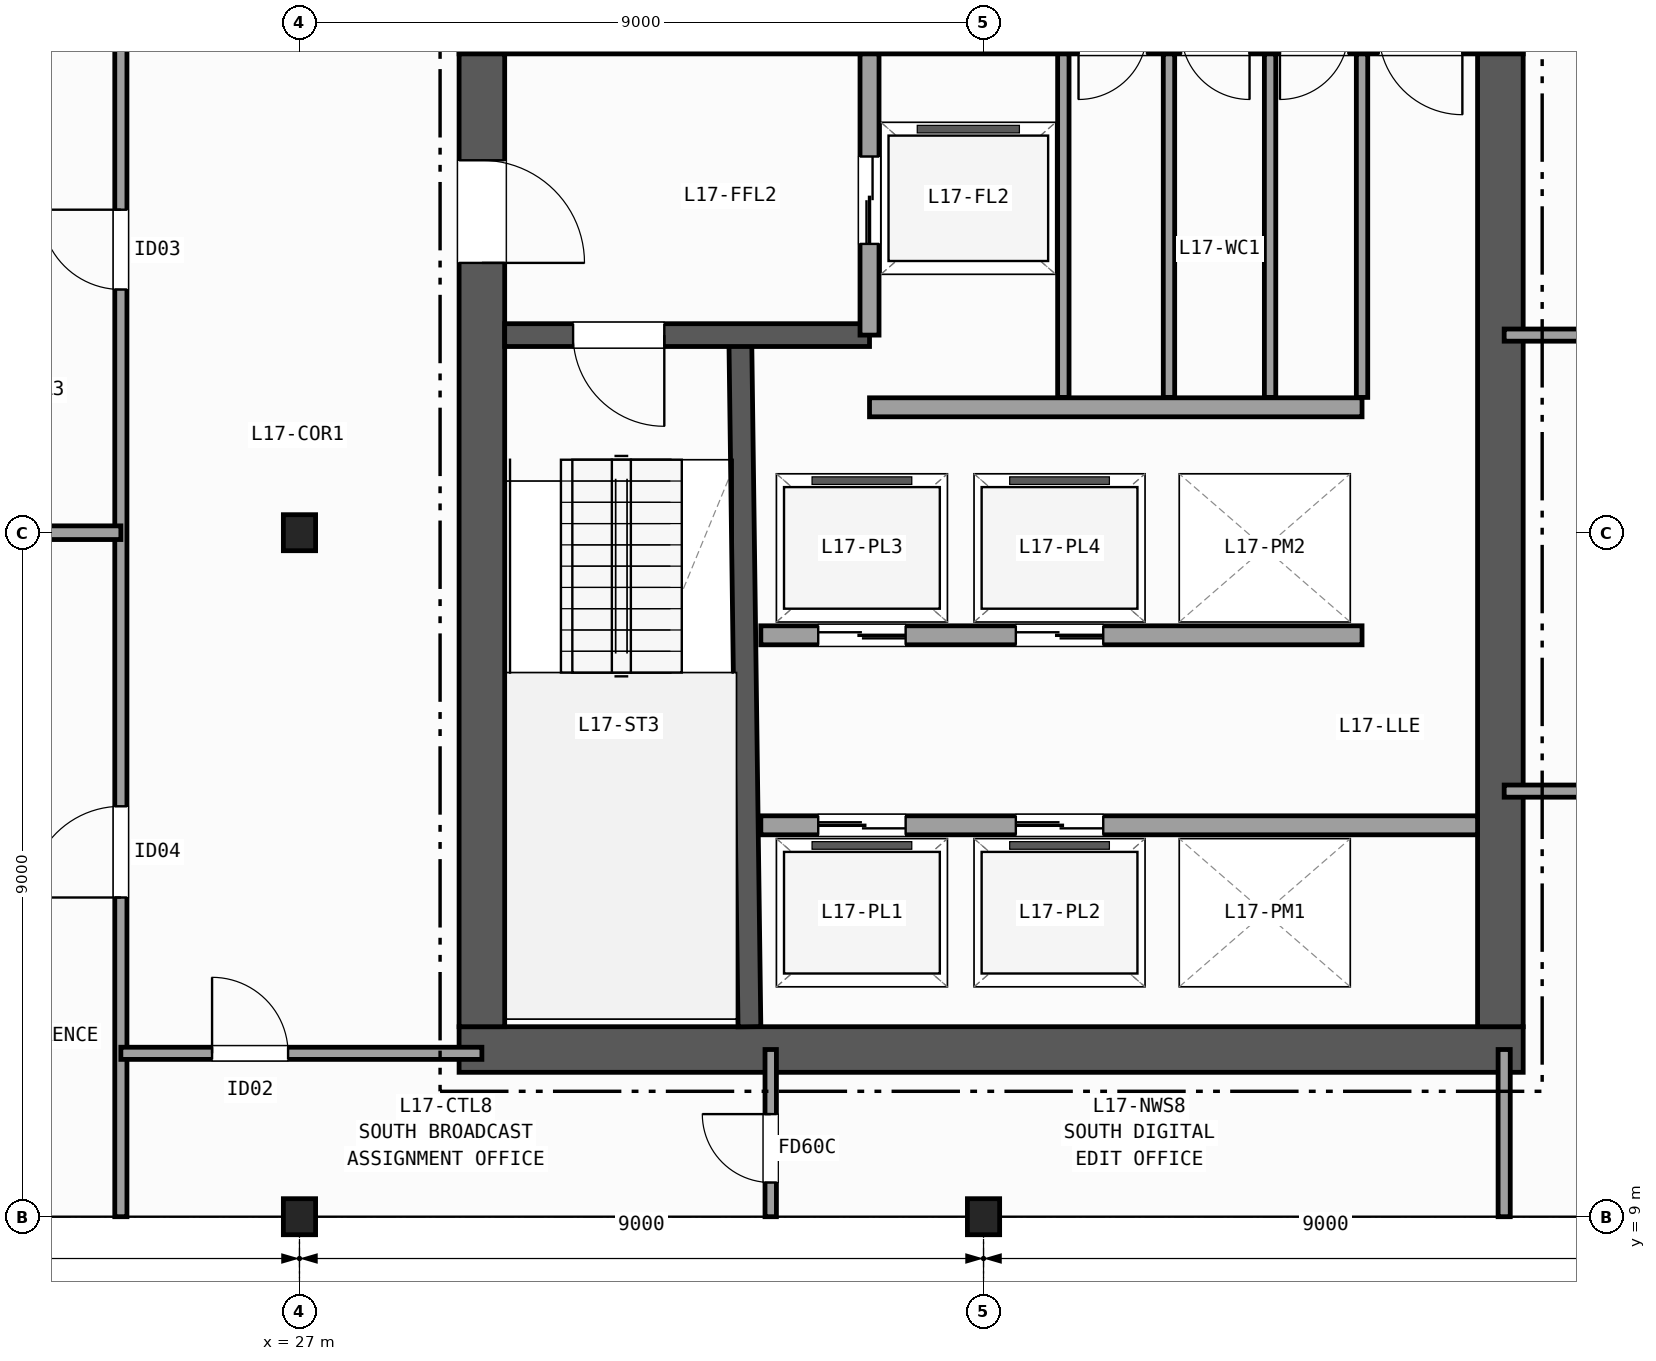
"""IFC4 building model, lengths in metres.
Left out: names, types, materials, properties, quantities, classifications, styles, units other than length and angle.
Written with IfcOpenShell. Run it as: python <this file> out.ifc"""

import sys

from ifc_helpers import new_model, si_unit, direction, frame, frame_2d, origin, origin_2d, place, context, subcontext, project, spatial, rectangle, i_section, extrude, element, fill, save


model = new_model("IFC4")
c1 = context("Model", 3, precision=1e-05, world=origin(), true_north=direction((0.0, 1.0)))
c2 = subcontext(c1, "Body", "Model", "MODEL_VIEW")
j1 = project(units=[si_unit("LENGTHUNIT", "METRE"), si_unit("PLANEANGLEUNIT", "RADIAN")], contexts=[c1])
p1 = place(None, origin())
s1 = spatial("IfcSite", under=j1, at=p1, CompositionType="ELEMENT")
p2 = place(p1, origin())
s2 = spatial("IfcBuilding", under=s1, at=p2, CompositionType="ELEMENT")
p3 = place(p2, frame((0.0, 0.0, 73.0)))
s3 = spatial("IfcBuildingStorey", under=s2, at=p3, CompositionType="ELEMENT", Elevation=73.0)
for number, where, z_axis, x_axis in (
    (1, (27.0, 9.0, 0.0), (0.0, 0.0, 1.0), (1.0, 0.0, 0.0)),
    (2, (27.0, 18.0, 0.0), (0.0, 0.0, 1.0), (1.0, 0.0, 0.0)),
    (3, (36.0, 9.0, 0.0), (0.0, 0.0, 1.0), (1.0, 0.0, 0.0)),
):
    element("IfcColumn", number, at=place(p3, frame(where, z_axis=z_axis, x_axis=x_axis)), inside=s3, PredefinedType="COLUMN", context=c2, shape_type="SweptSolid", body=[
        extrude(i_section(OverallWidth=0.424, OverallDepth=0.474, WebThickness=0.048, FlangeThickness=0.077, FilletRadius=0.015, at=origin_2d()), origin(), (0.0, 0.0, 1.0), 3.7),
    ])
p4 = place(p3, frame((29.1, 11.2, 0.0), z_axis=(0.0, 0.0, 1.0), x_axis=(1.0, 0.0, 0.0)))
e4 = element("IfcWall", 4, at=p4, inside=s3, PredefinedType="SHEAR", context=c2, shape_type="SweptSolid", body=[
    extrude(rectangle(XDim=14.0, YDim=0.6, at=frame_2d((7.0, 0.0))), origin(), (0.0, 0.0, 1.0), 3.42),
])
p5 = place(p3, frame((43.1, 24.6, 0.0), z_axis=(0.0, 0.0, 1.0), x_axis=(-1.0, 0.0, 0.0)))
e5 = element("IfcWall", 5, at=p5, inside=s3, PredefinedType="SHEAR", context=c2, shape_type="SweptSolid", body=[
    extrude(rectangle(XDim=14.0, YDim=0.6, at=frame_2d((7.0, 0.0))), origin(), (0.0, 0.0, 1.0), 3.42),
])
p6 = place(p5, frame((0.8, 0.0, 0.0)))
e6 = element("IfcOpeningElement", 6, at=p6, cuts=e5, PredefinedType="OPENING", context=c2, shape_type="SweptSolid", body=[
    extrude(rectangle(XDim=1.1, YDim=2.15, at=frame_2d((0.55, 1.075))), frame((0.0, 0.31, 0.0), z_axis=(0.0, -1.0, 0.0), x_axis=(1.0, 0.0, 0.0)), (0.0, 0.0, 1.0), 0.62),
])
p7 = place(p5, frame((2.3, 0.0, 0.0)))
e7 = element("IfcOpeningElement", 7, at=p7, cuts=e5, PredefinedType="OPENING", context=c2, shape_type="SweptSolid", body=[
    extrude(rectangle(XDim=0.9, YDim=2.1, at=frame_2d((0.45, 1.05))), frame((0.0, 0.31, 0.0), z_axis=(0.0, -1.0, 0.0), x_axis=(1.0, 0.0, 0.0)), (0.0, 0.0, 1.0), 0.62),
])
p8 = place(p5, frame((3.6, 0.0, 0.0)))
e8 = element("IfcOpeningElement", 8, at=p8, cuts=e5, PredefinedType="OPENING", context=c2, shape_type="SweptSolid", body=[
    extrude(rectangle(XDim=0.9, YDim=2.1, at=frame_2d((0.45, 1.05))), frame((0.0, 0.31, 0.0), z_axis=(0.0, -1.0, 0.0), x_axis=(1.0, 0.0, 0.0)), (0.0, 0.0, 1.0), 0.62),
])
p9 = place(p5, frame((4.95, 0.0, 0.0)))
e9 = element("IfcOpeningElement", 9, at=p9, cuts=e5, PredefinedType="OPENING", context=c2, shape_type="SweptSolid", body=[
    extrude(rectangle(XDim=0.9, YDim=2.1, at=frame_2d((0.45, 1.05))), frame((0.0, 0.31, 0.0), z_axis=(0.0, -1.0, 0.0), x_axis=(1.0, 0.0, 0.0)), (0.0, 0.0, 1.0), 0.62),
])
p10 = place(p3, frame((29.4, 24.3, 0.0), z_axis=(0.0, 0.0, 1.0), x_axis=(0.0, -1.0, 0.0)))
e10 = element("IfcWall", 10, at=p10, inside=s3, PredefinedType="SHEAR", context=c2, shape_type="SweptSolid", body=[
    extrude(rectangle(XDim=12.8, YDim=0.6, at=frame_2d((6.4, 0.0))), origin(), (0.0, 0.0, 1.0), 3.42),
])
p11 = place(p10, frame((1.4, 0.0, 0.0)))
e11 = element("IfcOpeningElement", 11, at=p11, cuts=e10, PredefinedType="OPENING", context=c2, shape_type="SweptSolid", body=[
    extrude(rectangle(XDim=1.35, YDim=2.15, at=frame_2d((0.675, 1.075))), frame((0.0, 0.31, 0.0), z_axis=(0.0, -1.0, 0.0), x_axis=(1.0, 0.0, 0.0)), (0.0, 0.0, 1.0), 0.62),
])
p12 = place(p3, frame((42.8, 11.5, 0.0), z_axis=(0.0, 0.0, 1.0), x_axis=(0.0, 1.0, 0.0)))
e12 = element("IfcWall", 12, at=p12, inside=s3, PredefinedType="SHEAR", context=c2, shape_type="SweptSolid", body=[
    extrude(rectangle(XDim=12.8, YDim=0.6, at=frame_2d((6.4, 0.0))), origin(), (0.0, 0.0, 1.0), 3.42),
])
p13 = place(p3, frame((32.92, 11.5, 0.0), z_axis=(0.0, 0.0, 1.0), x_axis=(-0.013244407292, 0.999912288991, 0.0)))
e13 = element("IfcWall", 13, at=p13, inside=s3, PredefinedType="SHEAR", context=c2, shape_type="SweptSolid", body=[
    extrude(rectangle(XDim=9.051, YDim=0.3, at=frame_2d((4.525, 0.0))), origin(), (0.0, 0.0, 1.0), 3.42),
])
p14 = place(p3, frame((34.5, 20.6, 0.0), z_axis=(0.0, 0.0, 1.0), x_axis=(-1.0, 0.0, 0.0)))
e14 = element("IfcWall", 14, at=p14, inside=s3, PredefinedType="SHEAR", context=c2, shape_type="SweptSolid", body=[
    extrude(rectangle(XDim=4.8, YDim=0.3, at=frame_2d((2.4, 0.0))), origin(), (0.0, 0.0, 1.0), 3.42),
])
p15 = place(p14, frame((2.7, 0.0, 0.0)))
e15 = element("IfcOpeningElement", 15, at=p15, cuts=e14, PredefinedType="OPENING", context=c2, shape_type="SweptSolid", body=[
    extrude(rectangle(XDim=1.2, YDim=2.15, at=frame_2d((0.6, 1.075))), frame((0.0, 0.16, 0.0), z_axis=(0.0, -1.0, 0.0), x_axis=(1.0, 0.0, 0.0)), (0.0, 0.0, 1.0), 0.32),
])
p16 = place(p3, frame((34.5, 20.6, 0.0), z_axis=(0.0, 0.0, 1.0), x_axis=(0.0, 1.0, 0.0)))
e16 = element("IfcWall", 16, at=p16, inside=s3, PredefinedType="PARTITIONING", context=c2, shape_type="SweptSolid", body=[
    extrude(rectangle(XDim=3.7, YDim=0.25, at=frame_2d((1.85, 0.0))), origin(), (0.0, 0.0, 1.0), 3.42),
])
p17 = place(p16, frame((1.2, 0.0, 0.0)))
e17 = element("IfcOpeningElement", 17, at=p17, cuts=e16, PredefinedType="OPENING", context=c2, shape_type="SweptSolid", body=[
    extrude(rectangle(XDim=1.15, YDim=2.15, at=frame_2d((0.575, 1.075))), frame((0.0, 0.135, 0.0), z_axis=(0.0, -1.0, 0.0), x_axis=(1.0, 0.0, 0.0)), (0.0, 0.0, 1.0), 0.27),
])
p18 = place(p3, frame((34.5, 19.65, 0.0), z_axis=(0.0, 0.0, 1.0), x_axis=(1.0, 0.0, 0.0)))
e18 = element("IfcWall", 18, at=p18, inside=s3, PredefinedType="PARTITIONING", context=c2, shape_type="SweptSolid", body=[
    extrude(rectangle(XDim=6.48, YDim=0.25, at=frame_2d((3.24, 0.0))), origin(), (0.0, 0.0, 1.0), 3.42),
])
p19 = place(p3, frame((33.07, 14.15, 0.0), z_axis=(0.0, 0.0, 1.0), x_axis=(1.0, 0.0, 0.0)))
e19 = element("IfcWall", 19, at=p19, inside=s3, PredefinedType="PARTITIONING", context=c2, shape_type="SweptSolid", body=[
    extrude(rectangle(XDim=9.43, YDim=0.25, at=frame_2d((4.715, 0.0))), origin(), (0.0, 0.0, 1.0), 3.42),
])
p20 = place(p19, frame((0.755, 0.0, 0.0)))
e20 = element("IfcOpeningElement", 20, at=p20, cuts=e19, PredefinedType="OPENING", context=c2, shape_type="SweptSolid", body=[
    extrude(rectangle(XDim=1.15, YDim=2.15, at=frame_2d((0.575, 1.075))), frame((0.0, 0.135, 0.0), z_axis=(0.0, -1.0, 0.0), x_axis=(1.0, 0.0, 0.0)), (0.0, 0.0, 1.0), 0.27),
])
p21 = place(p19, frame((3.355, 0.0, 0.0)))
e21 = element("IfcOpeningElement", 21, at=p21, cuts=e19, PredefinedType="OPENING", context=c2, shape_type="SweptSolid", body=[
    extrude(rectangle(XDim=1.15, YDim=2.15, at=frame_2d((0.575, 1.075))), frame((0.0, 0.135, 0.0), z_axis=(0.0, -1.0, 0.0), x_axis=(1.0, 0.0, 0.0)), (0.0, 0.0, 1.0), 0.27),
])
p22 = place(p3, frame((40.98, 16.65, 0.0), z_axis=(0.0, 0.0, 1.0), x_axis=(-1.0, 0.0, 0.0)))
e22 = element("IfcWall", 22, at=p22, inside=s3, PredefinedType="PARTITIONING", context=c2, shape_type="SweptSolid", body=[
    extrude(rectangle(XDim=7.91, YDim=0.25, at=frame_2d((3.955, 0.0))), origin(), (0.0, 0.0, 1.0), 3.42),
])
p23 = place(p22, frame((6.005, 0.0, 0.0)))
e23 = element("IfcOpeningElement", 23, at=p23, cuts=e22, PredefinedType="OPENING", context=c2, shape_type="SweptSolid", body=[
    extrude(rectangle(XDim=1.15, YDim=2.15, at=frame_2d((0.575, 1.075))), frame((0.0, 0.135, 0.0), z_axis=(0.0, -1.0, 0.0), x_axis=(1.0, 0.0, 0.0)), (0.0, 0.0, 1.0), 0.27),
])
p24 = place(p22, frame((3.405, 0.0, 0.0)))
e24 = element("IfcOpeningElement", 24, at=p24, cuts=e22, PredefinedType="OPENING", context=c2, shape_type="SweptSolid", body=[
    extrude(rectangle(XDim=1.15, YDim=2.15, at=frame_2d((0.575, 1.075))), frame((0.0, 0.135, 0.0), z_axis=(0.0, -1.0, 0.0), x_axis=(1.0, 0.0, 0.0)), (0.0, 0.0, 1.0), 0.27),
])
for number, where, z_axis, x_axis in (
    (25, (37.05, 19.78, 0.0), (0.0, 0.0, 1.0), (0.0, 1.0, 0.0)),
    (26, (38.44, 19.78, 0.0), (0.0, 0.0, 1.0), (0.0, 1.0, 0.0)),
    (27, (39.77, 19.78, 0.0), (0.0, 0.0, 1.0), (0.0, 1.0, 0.0)),
    (28, (40.98, 19.78, 0.0), (0.0, 0.0, 1.0), (0.0, 1.0, 0.0)),
):
    element("IfcWall", number, at=place(p3, frame(where, z_axis=z_axis, x_axis=x_axis)), inside=s3, PredefinedType="PARTITIONING", context=c2, shape_type="SweptSolid", body=[
        extrude(rectangle(XDim=4.52, YDim=0.15, at=frame_2d((2.26, 0.0))), origin(), (0.0, 0.0, 1.0), 3.42),
    ])
p25 = place(p3, frame((24.65, 9.0, 0.0), z_axis=(0.0, 0.0, 1.0), x_axis=(0.0, 1.0, 0.0)))
e29 = element("IfcWall", 29, at=p25, inside=s3, PredefinedType="PARTITIONING", context=c2, shape_type="SweptSolid", body=[
    extrude(rectangle(XDim=19.2, YDim=0.16, at=frame_2d((9.6, 0.0))), origin(), (0.0, 0.0, 1.0), 2.627),
])
p26 = place(p25, frame((12.2, 0.0, 0.0)))
e30 = element("IfcOpeningElement", 30, at=p26, cuts=e29, PredefinedType="OPENING", context=c2, shape_type="SweptSolid", body=[
    extrude(rectangle(XDim=1.05, YDim=2.15, at=frame_2d((0.525, 1.075))), frame((0.0, 0.09, 0.0), z_axis=(0.0, -1.0, 0.0), x_axis=(1.0, 0.0, 0.0)), (0.0, 0.0, 1.0), 0.18),
])
p27 = place(p25, frame((4.2, 0.0, 0.0)))
e31 = element("IfcOpeningElement", 31, at=p27, cuts=e29, PredefinedType="OPENING", context=c2, shape_type="SweptSolid", body=[
    extrude(rectangle(XDim=1.2, YDim=2.15, at=frame_2d((0.6, 1.075))), frame((0.0, 0.09, 0.0), z_axis=(0.0, -1.0, 0.0), x_axis=(1.0, 0.0, 0.0)), (0.0, 0.0, 1.0), 0.18),
])
p28 = place(p3, frame((9.0, 18.0, 0.0), z_axis=(0.0, 0.0, 1.0), x_axis=(1.0, 0.0, 0.0)))
e32 = element("IfcWall", 32, at=p28, inside=s3, PredefinedType="PARTITIONING", context=c2, shape_type="SweptSolid", body=[
    extrude(rectangle(XDim=15.65, YDim=0.18, at=frame_2d((7.825, 0.0))), origin(), (0.0, 0.0, 1.0), 2.627),
])
p29 = place(p3, frame((24.65, 11.15, 0.0), z_axis=(0.0, 0.0, 1.0), x_axis=(1.0, 0.0, 0.0)))
e33 = element("IfcWall", 33, at=p29, inside=s3, PredefinedType="PARTITIONING", context=c2, shape_type="SweptSolid", body=[
    extrude(rectangle(XDim=4.75, YDim=0.16, at=frame_2d((2.375, 0.0))), origin(), (0.0, 0.0, 1.0), 2.792),
])
p30 = place(p29, frame((1.2, 0.0, 0.0)))
e34 = element("IfcOpeningElement", 34, at=p30, cuts=e33, PredefinedType="OPENING", context=c2, shape_type="SweptSolid", body=[
    extrude(rectangle(XDim=1.0, YDim=2.1, at=frame_2d((0.5, 1.05))), frame((0.0, 0.09, 0.0), z_axis=(0.0, -1.0, 0.0), x_axis=(1.0, 0.0, 0.0)), (0.0, 0.0, 1.0), 0.18),
])
p31 = place(p3, frame((33.2, 9.0, 0.0), z_axis=(0.0, 0.0, 1.0), x_axis=(0.0, 1.0, 0.0)))
e35 = element("IfcWall", 35, at=p31, inside=s3, PredefinedType="PARTITIONING", context=c2, shape_type="SweptSolid", body=[
    extrude(rectangle(XDim=2.2, YDim=0.15, at=frame_2d((1.1, 0.0))), origin(), (0.0, 0.0, 1.0), 2.627),
])
p32 = place(p31, frame((0.45, 0.0, 0.0)))
e36 = element("IfcOpeningElement", 36, at=p32, cuts=e35, PredefinedType="OPENING", context=c2, shape_type="SweptSolid", body=[
    extrude(rectangle(XDim=0.9, YDim=2.1, at=frame_2d((0.45, 1.05))), frame((0.0, 0.085, 0.0), z_axis=(0.0, -1.0, 0.0), x_axis=(1.0, 0.0, 0.0)), (0.0, 0.0, 1.0), 0.17),
])
p33 = place(p3, frame((42.85, 9.0, 0.0), z_axis=(0.0, 0.0, 1.0), x_axis=(0.0, 1.0, 0.0)))
e37 = element("IfcWall", 37, at=p33, inside=s3, PredefinedType="PARTITIONING", context=c2, shape_type="SweptSolid", body=[
    extrude(rectangle(XDim=2.2, YDim=0.16, at=frame_2d((1.1, 0.0))), origin(), (0.0, 0.0, 1.0), 2.627),
])
p34 = place(p3, frame((42.85, 14.6, 0.0), z_axis=(0.0, 0.0, 1.0), x_axis=(1.0, 0.0, 0.0)))
e38 = element("IfcWall", 38, at=p34, inside=s3, PredefinedType="PARTITIONING", context=c2, shape_type="SweptSolid", body=[
    extrude(rectangle(XDim=20.5, YDim=0.16, at=frame_2d((10.25, 0.0))), origin(), (0.0, 0.0, 1.0), 3.42),
])
p35 = place(p34, frame((3.4, 0.0, 0.0)))
e39 = element("IfcOpeningElement", 39, at=p35, cuts=e38, PredefinedType="OPENING", context=c2, shape_type="SweptSolid", body=[
    extrude(rectangle(XDim=0.86, YDim=2.05, at=frame_2d((0.43, 1.025))), frame((0.0, 0.09, 0.0), z_axis=(0.0, -1.0, 0.0), x_axis=(1.0, 0.0, 0.0)), (0.0, 0.0, 1.0), 0.18),
])
p36 = place(p3, frame((42.85, 20.6, 0.0), z_axis=(0.0, 0.0, 1.0), x_axis=(1.0, 0.0, 0.0)))
e40 = element("IfcWall", 40, at=p36, inside=s3, PredefinedType="PARTITIONING", context=c2, shape_type="SweptSolid", body=[
    extrude(rectangle(XDim=20.582, YDim=0.16, at=frame_2d((10.291, 0.0))), origin(), (0.0, 0.0, 1.0), 3.42),
])
p37 = place(p36, frame((3.4, 0.0, 0.0)))
e41 = element("IfcOpeningElement", 41, at=p37, cuts=e40, PredefinedType="OPENING", context=c2, shape_type="SweptSolid", body=[
    extrude(rectangle(XDim=0.95, YDim=2.1, at=frame_2d((0.475, 1.05))), frame((0.0, 0.09, 0.0), z_axis=(0.0, -1.0, 0.0), x_axis=(1.0, 0.0, 0.0)), (0.0, 0.0, 1.0), 0.18),
])
p38 = place(p15, origin())
e42 = element("IfcDoor", 42, at=p38, inside=s3, OperationType="SINGLE_SWING_LEFT", PredefinedType="DOOR", context=c2, shape_type="SweptSolid", body=[
    extrude(rectangle(XDim=1.2, YDim=2.15, at=frame_2d((0.6, 1.075))), frame((0.0, 0.025, 0.0), z_axis=(0.0, -1.0, 0.0), x_axis=(1.0, 0.0, 0.0)), (0.0, 0.0, 1.0), 0.05),
])
fill(e15, e42)
p39 = place(p11, origin())
e43 = element("IfcDoor", 43, at=p39, inside=s3, OperationType="SINGLE_SWING_RIGHT", PredefinedType="DOOR", context=c2, shape_type="SweptSolid", body=[
    extrude(rectangle(XDim=1.35, YDim=2.15, at=frame_2d((0.675, 1.075))), frame((0.0, 0.025, 0.0), z_axis=(0.0, -1.0, 0.0), x_axis=(1.0, 0.0, 0.0)), (0.0, 0.0, 1.0), 0.05),
])
fill(e11, e43)
p40 = place(p17, origin())
e44 = element("IfcDoor", 44, at=p40, inside=s3, OperationType="DOUBLE_DOOR_SLIDING", PredefinedType="DOOR", context=c2, shape_type="SweptSolid", body=[
    extrude(rectangle(XDim=1.15, YDim=2.15, at=frame_2d((0.575, 1.075))), frame((0.0, 0.025, 0.0), z_axis=(0.0, -1.0, 0.0), x_axis=(1.0, 0.0, 0.0)), (0.0, 0.0, 1.0), 0.05),
])
fill(e17, e44)
p41 = place(p20, origin())
e45 = element("IfcDoor", 45, at=p41, inside=s3, OperationType="DOUBLE_DOOR_SLIDING", PredefinedType="DOOR", context=c2, shape_type="SweptSolid", body=[
    extrude(rectangle(XDim=1.15, YDim=2.15, at=frame_2d((0.575, 1.075))), frame((0.0, 0.025, 0.0), z_axis=(0.0, -1.0, 0.0), x_axis=(1.0, 0.0, 0.0)), (0.0, 0.0, 1.0), 0.05),
])
fill(e20, e45)
p42 = place(p21, origin())
e46 = element("IfcDoor", 46, at=p42, inside=s3, OperationType="DOUBLE_DOOR_SLIDING", PredefinedType="DOOR", context=c2, shape_type="SweptSolid", body=[
    extrude(rectangle(XDim=1.15, YDim=2.15, at=frame_2d((0.575, 1.075))), frame((0.0, 0.025, 0.0), z_axis=(0.0, -1.0, 0.0), x_axis=(1.0, 0.0, 0.0)), (0.0, 0.0, 1.0), 0.05),
])
fill(e21, e46)
p43 = place(p23, origin())
e47 = element("IfcDoor", 47, at=p43, inside=s3, OperationType="DOUBLE_DOOR_SLIDING", PredefinedType="DOOR", context=c2, shape_type="SweptSolid", body=[
    extrude(rectangle(XDim=1.15, YDim=2.15, at=frame_2d((0.575, 1.075))), frame((0.0, 0.025, 0.0), z_axis=(0.0, -1.0, 0.0), x_axis=(1.0, 0.0, 0.0)), (0.0, 0.0, 1.0), 0.05),
])
fill(e23, e47)
p44 = place(p24, origin())
e48 = element("IfcDoor", 48, at=p44, inside=s3, OperationType="DOUBLE_DOOR_SLIDING", PredefinedType="DOOR", context=c2, shape_type="SweptSolid", body=[
    extrude(rectangle(XDim=1.15, YDim=2.15, at=frame_2d((0.575, 1.075))), frame((0.0, 0.025, 0.0), z_axis=(0.0, -1.0, 0.0), x_axis=(1.0, 0.0, 0.0)), (0.0, 0.0, 1.0), 0.05),
])
fill(e24, e48)
p45 = place(p26, origin())
e49 = element("IfcDoor", 49, at=p45, inside=s3, OperationType="SINGLE_SWING_RIGHT", PredefinedType="DOOR", context=c2, shape_type="SweptSolid", body=[
    extrude(rectangle(XDim=1.05, YDim=2.15, at=frame_2d((0.525, 1.075))), frame((0.0, 0.025, 0.0), z_axis=(0.0, -1.0, 0.0), x_axis=(1.0, 0.0, 0.0)), (0.0, 0.0, 1.0), 0.05),
])
fill(e30, e49)
p46 = place(p27, origin())
e50 = element("IfcDoor", 50, at=p46, inside=s3, OperationType="SINGLE_SWING_LEFT", PredefinedType="DOOR", context=c2, shape_type="SweptSolid", body=[
    extrude(rectangle(XDim=1.2, YDim=2.15, at=frame_2d((0.6, 1.075))), frame((0.0, 0.025, 0.0), z_axis=(0.0, -1.0, 0.0), x_axis=(1.0, 0.0, 0.0)), (0.0, 0.0, 1.0), 0.05),
])
fill(e31, e50)
p47 = place(p30, origin())
e51 = element("IfcDoor", 51, at=p47, inside=s3, OperationType="SINGLE_SWING_LEFT", PredefinedType="DOOR", context=c2, shape_type="SweptSolid", body=[
    extrude(rectangle(XDim=1.0, YDim=2.1, at=frame_2d((0.5, 1.05))), frame((0.0, 0.025, 0.0), z_axis=(0.0, -1.0, 0.0), x_axis=(1.0, 0.0, 0.0)), (0.0, 0.0, 1.0), 0.05),
])
fill(e34, e51)
p48 = place(p32, origin())
e52 = element("IfcDoor", 52, at=p48, inside=s3, OperationType="SINGLE_SWING_RIGHT", PredefinedType="DOOR", context=c2, shape_type="SweptSolid", body=[
    extrude(rectangle(XDim=0.9, YDim=2.1, at=frame_2d((0.45, 1.05))), frame((0.0, 0.025, 0.0), z_axis=(0.0, -1.0, 0.0), x_axis=(1.0, 0.0, 0.0)), (0.0, 0.0, 1.0), 0.05),
])
fill(e36, e52)
save(model, sys.argv[1])
